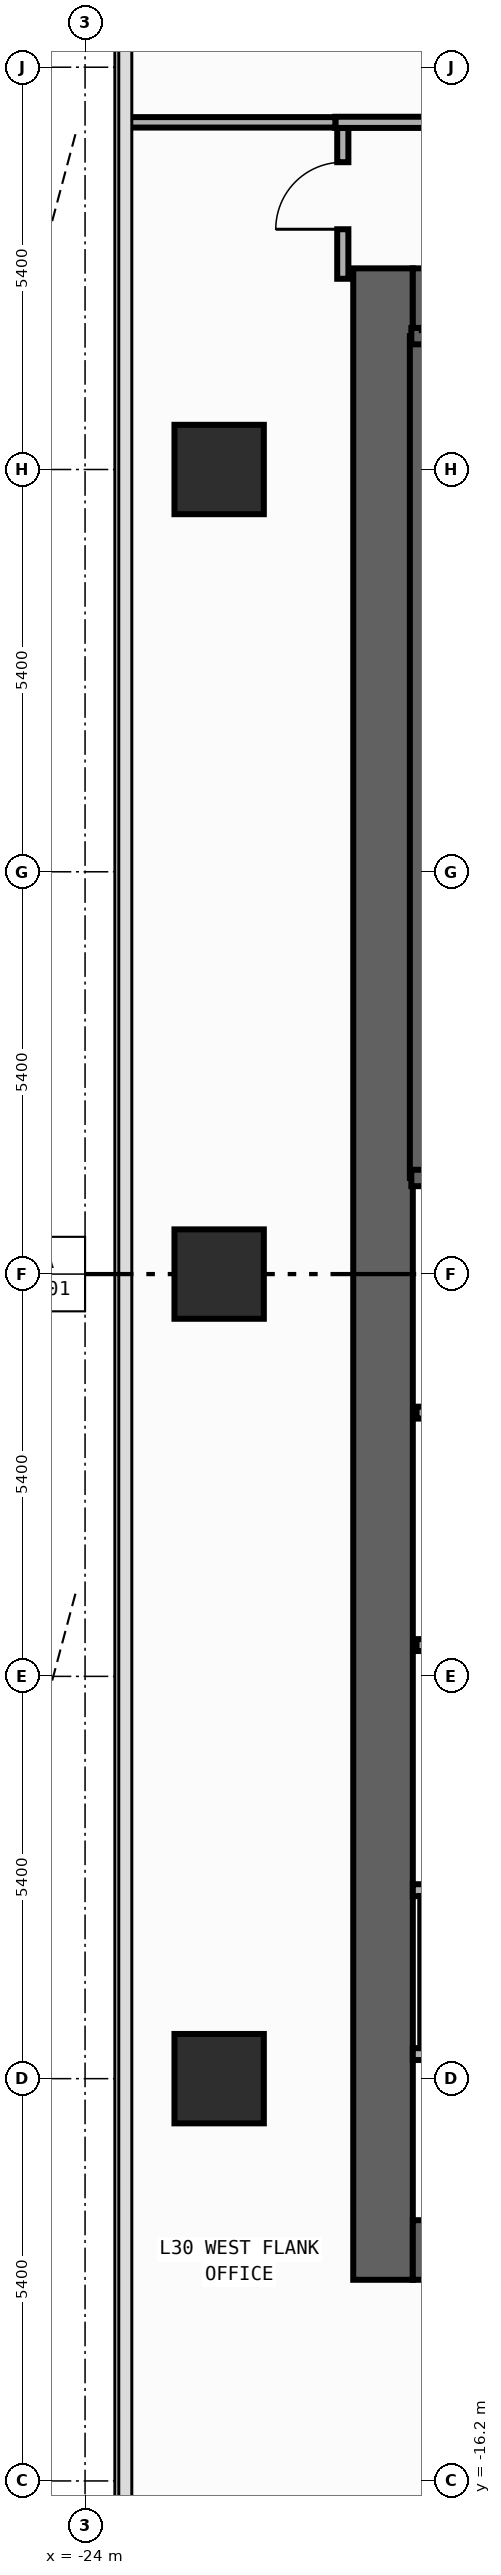
"""IFC4 building model, lengths in metres.
Left out: names, types, materials, properties, quantities, classifications, styles, units other than length and angle.
Written with IfcOpenShell. Run it as: python <this file> out.ifc"""

import sys

from ifc_helpers import new_model, si_unit, direction, frame, frame_2d, origin, origin_2d, place, context, subcontext, project, spatial, rectangle, extrude, element, fill, save


model = new_model("IFC4")
c1 = context("Model", 3, precision=1e-05, world=origin(), true_north=direction((0.0, 1.0)))
c2 = subcontext(c1, "Body", "Model", "MODEL_VIEW")
j1 = project(units=[si_unit("LENGTHUNIT", "METRE"), si_unit("PLANEANGLEUNIT", "RADIAN")], contexts=[c1])
p1 = place(None, origin())
s1 = spatial("IfcSite", under=j1, at=p1, CompositionType="ELEMENT")
p2 = place(p1, origin())
s2 = spatial("IfcBuilding", under=s1, at=p2, CompositionType="ELEMENT")
p3 = place(p2, frame((0.0, 0.0, 131.0)))
s3 = spatial("IfcBuildingStorey", under=s2, at=p3, CompositionType="ELEMENT", Elevation=131.0)
p4 = place(p3, frame((-20.0, -13.5, 0.0), z_axis=(0.0, 0.0, 1.0), x_axis=(0.0, 1.0, 0.0)))
e1 = element("IfcWall", 1, at=p4, inside=s3, PredefinedType="SHEAR", context=c2, shape_type="SweptSolid", body=[
    extrude(rectangle(XDim=27.0, YDim=0.8, at=frame_2d((13.5, 0.0))), origin(), (0.0, 0.0, 1.0), 3.94),
])
for number, where, z_axis, x_axis in (
    (2, (-19.6, -13.1, 0.0), (0.0, 0.0, 1.0), (1.0, 0.0, 0.0)),
    (3, (-19.6, 13.1, 0.0), (0.0, 0.0, 1.0), (1.0, 0.0, 0.0)),
):
    element("IfcWall", number, at=place(p3, frame(where, z_axis=z_axis, x_axis=x_axis)), inside=s3, PredefinedType="SHEAR", context=c2, shape_type="SweptSolid", body=[
        extrude(rectangle(XDim=6.8, YDim=0.8, at=frame_2d((3.4, 0.0))), origin(), (0.0, 0.0, 1.0), 3.94),
    ])
p5 = place(p3, frame((-19.53, 1.29, 0.0), z_axis=(0.0, 0.0, 1.0), x_axis=(0.0, 1.0, 0.0)))
e4 = element("IfcWall", 4, at=p5, inside=s3, PredefinedType="SHEAR", context=c2, shape_type="SweptSolid", body=[
    extrude(rectangle(XDim=11.3, YDim=0.22, at=frame_2d((5.65, 0.0))), origin(), (0.0, 0.0, 1.0), 3.94),
])
p6 = place(p3, frame((-19.62, 12.59, 0.0), z_axis=(0.0, 0.0, 1.0), x_axis=(1.0, 0.0, 0.0)))
e5 = element("IfcWall", 5, at=p6, inside=s3, PredefinedType="SHEAR", context=c2, shape_type="SweptSolid", body=[
    extrude(rectangle(XDim=3.915, YDim=0.22, at=frame_2d((1.958, 0.0))), origin(), (0.0, 0.0, 1.0), 3.94),
])
p7 = place(p3, frame((-19.62, 1.29, 0.0), z_axis=(0.0, 0.0, 1.0), x_axis=(1.0, 0.0, 0.0)))
e6 = element("IfcWall", 6, at=p7, inside=s3, PredefinedType="SHEAR", context=c2, shape_type="SweptSolid", body=[
    extrude(rectangle(XDim=3.915, YDim=0.22, at=frame_2d((1.958, 0.0))), origin(), (0.0, 0.0, 1.0), 3.94),
])
p8 = place(p7, frame((1.08, 0.0, 0.0)))
e7 = element("IfcOpeningElement", 7, at=p8, cuts=e6, PredefinedType="OPENING", context=c2, shape_type="SweptSolid", body=[
    extrude(rectangle(XDim=1.1, YDim=2.2, at=frame_2d((0.55, 1.1))), frame((0.0, 0.12, 0.0), z_axis=(0.0, -1.0, 0.0), x_axis=(1.0, 0.0, 0.0)), (0.0, 0.0, 1.0), 0.24),
])
for number, where, z_axis, x_axis in (
    (8, (-22.2, -10.8, 0.0), (0.0, 0.0, 1.0), (1.0, 0.0, 0.0)),
    (9, (-22.2, 0.0, 0.0), (0.0, 0.0, 1.0), (1.0, 0.0, 0.0)),
    (10, (-22.2, 10.8, 0.0), (0.0, 0.0, 1.0), (1.0, 0.0, 0.0)),
):
    element("IfcColumn", number, at=place(p3, frame(where, z_axis=z_axis, x_axis=x_axis)), inside=s3, PredefinedType="COLUMN", context=c2, shape_type="SweptSolid", body=[
        extrude(rectangle(XDim=1.2, YDim=1.2, at=origin_2d()), origin(), (0.0, 0.0, 1.0), 4.2),
    ])
p9 = place(p3, frame((-19.55, -1.86, 0.0), z_axis=(0.0, 0.0, 1.0), x_axis=(1.0, 0.0, 0.0)))
e11 = element("IfcWall", 11, at=p9, inside=s3, PredefinedType="STANDARD", context=c2, shape_type="SweptSolid", body=[
    extrude(rectangle(XDim=3.8, YDim=0.16, at=frame_2d((1.9, 0.0))), origin(), (0.0, 0.0, 1.0), 3.94),
])
p10 = place(p9, frame((1.18, 0.0, 0.0)))
e12 = element("IfcOpeningElement", 12, at=p10, cuts=e11, PredefinedType="OPENING", context=c2, shape_type="SweptSolid", body=[
    extrude(rectangle(XDim=1.15, YDim=2.2, at=frame_2d((0.575, 1.1))), frame((0.0, 0.09, 0.0), z_axis=(0.0, -1.0, 0.0), x_axis=(1.0, 0.0, 0.0)), (0.0, 0.0, 1.0), 0.18),
])
p11 = place(p3, frame((-19.55, -4.98, 0.0), z_axis=(0.0, 0.0, 1.0), x_axis=(1.0, 0.0, 0.0)))
e13 = element("IfcWall", 13, at=p11, inside=s3, PredefinedType="STANDARD", context=c2, shape_type="SweptSolid", body=[
    extrude(rectangle(XDim=3.8, YDim=0.16, at=frame_2d((1.9, 0.0))), origin(), (0.0, 0.0, 1.0), 3.94),
])
for number, where, z_axis, x_axis in (
    (14, (-19.6, -10.47, 0.0), (0.0, 0.0, 1.0), (1.0, 0.0, 0.0)),
    (15, (-19.6, -8.27, 0.0), (0.0, 0.0, 1.0), (1.0, 0.0, 0.0)),
):
    element("IfcWall", number, at=place(p3, frame(where, z_axis=z_axis, x_axis=x_axis)), inside=s3, PredefinedType="PARTITIONING", context=c2, shape_type="SweptSolid", body=[
        extrude(rectangle(XDim=2.29, YDim=0.16, at=frame_2d((1.145, 0.0))), origin(), (0.0, 0.0, 1.0), 3.94),
    ])
p12 = place(p3, frame((-20.54, 13.36, 0.0), z_axis=(0.0, 0.0, 1.0), x_axis=(0.0, 1.0, 0.0)))
e16 = element("IfcWall", 16, at=p12, inside=s3, PredefinedType="PARTITIONING", context=c2, shape_type="SweptSolid", body=[
    extrude(rectangle(XDim=2.025, YDim=0.15, at=frame_2d((1.012, 0.0))), origin(), (0.0, 0.0, 1.0), 3.94),
])
p13 = place(p12, frame((0.665, 0.0, 0.0)))
e17 = element("IfcOpeningElement", 17, at=p13, cuts=e16, PredefinedType="OPENING", context=c2, shape_type="SweptSolid", body=[
    extrude(rectangle(XDim=0.9, YDim=2.15, at=frame_2d((0.45, 1.075))), frame((0.0, 0.085, 0.0), z_axis=(0.0, -1.0, 0.0), x_axis=(1.0, 0.0, 0.0)), (0.0, 0.0, 1.0), 0.17),
])
p14 = place(p3, frame((-20.64, 15.46, 0.0), z_axis=(0.0, 0.0, 1.0), x_axis=(1.0, 0.0, 0.0)))
e18 = element("IfcWall", 18, at=p14, inside=s3, PredefinedType="PARTITIONING", context=c2, shape_type="SweptSolid", body=[
    extrude(rectangle(XDim=8.65, YDim=0.15, at=frame_2d((4.325, 0.0))), origin(), (0.0, 0.0, 1.0), 3.94),
])
p15 = place(p14, frame((2.871, 0.0, 0.0)))
e19 = element("IfcOpeningElement", 19, at=p15, cuts=e18, PredefinedType="OPENING", context=c2, shape_type="SweptSolid", body=[
    extrude(rectangle(XDim=0.9, YDim=2.15, at=frame_2d((0.45, 1.075))), frame((0.0, 0.085, 0.0), z_axis=(0.0, -1.0, 0.0), x_axis=(1.0, 0.0, 0.0)), (0.0, 0.0, 1.0), 0.17),
])
p16 = place(p3, frame((-23.455, 15.46, 0.0), z_axis=(0.0, 0.0, 1.0), x_axis=(1.0, 0.0, 0.0)))
e20 = element("IfcWall", 20, at=p16, inside=s3, PredefinedType="PARTITIONING", context=c2, shape_type="SweptSolid", body=[
    extrude(rectangle(XDim=2.815, YDim=0.14, at=frame_2d((1.408, 0.0))), origin(), (0.0, 0.0, 1.0), 3.94),
])
p17 = place(p3, frame((-19.45, -10.39, 0.0), z_axis=(0.0, 0.0, 1.0), x_axis=(0.0, 1.0, 0.0)))
e21 = element("IfcWall", 21, at=p17, inside=s3, PredefinedType="PARTITIONING", context=c2, shape_type="SweptSolid", body=[
    extrude(rectangle(XDim=2.04, YDim=0.1, at=frame_2d((1.02, 0.0))), origin(), (0.0, 0.0, 1.0), 3.94),
])
p18 = place(p13, origin())
e22 = element("IfcDoor", 22, at=p18, inside=s3, OperationType="SINGLE_SWING_LEFT", PredefinedType="DOOR", context=c2, shape_type="SweptSolid", body=[
    extrude(rectangle(XDim=0.9, YDim=2.15, at=frame_2d((0.45, 1.075))), frame((0.0, 0.025, 0.0), z_axis=(0.0, -1.0, 0.0), x_axis=(1.0, 0.0, 0.0)), (0.0, 0.0, 1.0), 0.05),
])
fill(e17, e22)
save(model, sys.argv[1])
